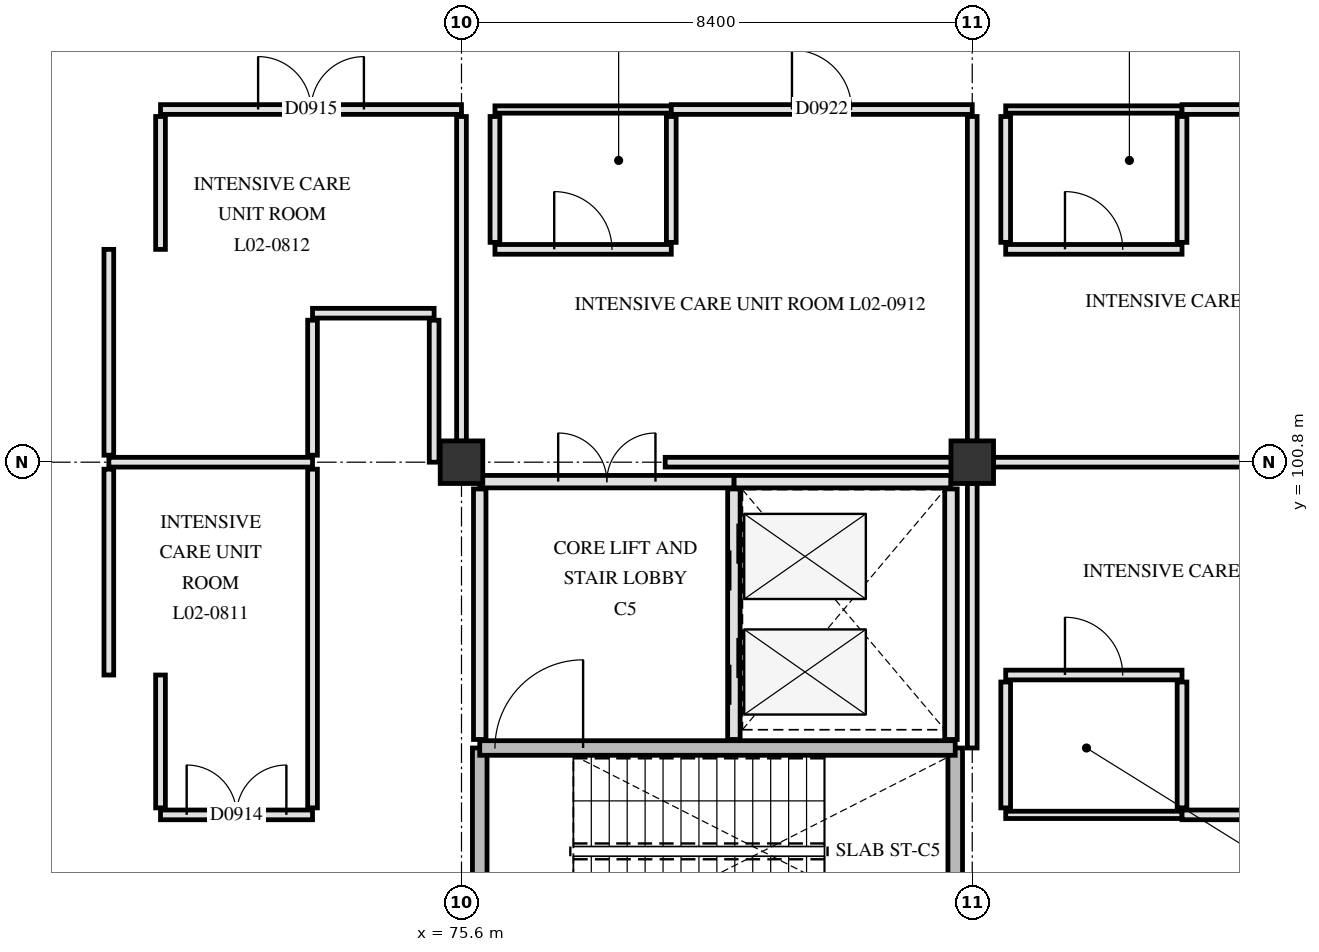
"""IFC4 building model, lengths in metres.
Left out: names, types, materials, properties, quantities, classifications, styles, units other than length and angle.
Written with IfcOpenShell. Run it as: python <this file> out.ifc"""

import sys

from ifc_helpers import new_model, si_unit, direction, frame, frame_2d, origin, origin_2d, place, context, subcontext, project, spatial, rectangle, extrude, element, fill, save


model = new_model("IFC4")
c1 = context("Model", 3, precision=1e-05, world=origin(), true_north=direction((0.0, 1.0)))
c2 = subcontext(c1, "Body", "Model", "MODEL_VIEW")
j1 = project(units=[si_unit("LENGTHUNIT", "METRE"), si_unit("PLANEANGLEUNIT", "RADIAN")], contexts=[c1])
p1 = place(None, origin())
s1 = spatial("IfcSite", under=j1, at=p1, CompositionType="ELEMENT")
p2 = place(p1, origin())
s2 = spatial("IfcBuilding", under=s1, at=p2, CompositionType="ELEMENT")
p3 = place(p2, frame((0.0, 0.0, 9.3)))
s3 = spatial("IfcBuildingStorey", under=s2, at=p3, CompositionType="ELEMENT", Elevation=9.3)
for number, where, z_axis, x_axis in (
    (1, (75.6, 100.8, 0.0), (0.0, 0.0, 1.0), (1.0, 0.0, 0.0)),
    (2, (84.0, 100.8, 0.0), (0.0, 0.0, 1.0), (1.0, 0.0, 0.0)),
):
    element("IfcColumn", number, at=place(p3, frame(where, z_axis=z_axis, x_axis=x_axis)), inside=s3, PredefinedType="COLUMN", context=c2, shape_type="SweptSolid", body=[
        extrude(rectangle(XDim=0.7, YDim=0.7, at=origin_2d()), origin(), (0.0, 0.0, 1.0), 5.1),
    ])
for number, where, z_axis, x_axis in (
    (3, (75.9, 92.78, 0.0), (0.0, 0.0, 1.0), (0.0, 1.0, 0.0)),
    (4, (83.72, 92.78, 0.0), (0.0, 0.0, 1.0), (0.0, 1.0, 0.0)),
):
    element("IfcWall", number, at=place(p3, frame(where, z_axis=z_axis, x_axis=x_axis)), inside=s3, PredefinedType="SHEAR", context=c2, shape_type="SweptSolid", body=[
        extrude(rectangle(XDim=3.32, YDim=0.24, at=frame_2d((1.66, 0.0))), origin(), (0.0, 0.0, 1.0), 4.78),
    ])
p4 = place(p3, frame((75.9, 96.1, 0.0), z_axis=(0.0, 0.0, 1.0), x_axis=(1.0, 0.0, 0.0)))
e5 = element("IfcWall", 5, at=p4, inside=s3, PredefinedType="SHEAR", context=c2, shape_type="SweptSolid", body=[
    extrude(rectangle(XDim=7.82, YDim=0.24, at=frame_2d((3.91, 0.0))), origin(), (0.0, 0.0, 1.0), 4.78),
])
p5 = place(p4, frame((0.25, 0.0, 0.0)))
e6 = element("IfcOpeningElement", 6, at=p5, cuts=e5, PredefinedType="OPENING", context=c2, shape_type="SweptSolid", body=[
    extrude(rectangle(XDim=1.45, YDim=2.2, at=frame_2d((0.725, 1.1))), frame((0.0, 0.13, 0.0), z_axis=(0.0, -1.0, 0.0), x_axis=(1.0, 0.0, 0.0)), (0.0, 0.0, 1.0), 0.26),
])
p6 = place(p3, frame((80.08, 96.24, 0.0), z_axis=(0.0, 0.0, 1.0), x_axis=(0.0, 1.0, 0.0)))
e7 = element("IfcWall", 7, at=p6, inside=s3, PredefinedType="PARTITIONING", context=c2, shape_type="SweptSolid", body=[
    extrude(rectangle(XDim=4.12, YDim=0.205, at=frame_2d((2.06, 0.0))), origin(), (0.0, 0.0, 1.0), 4.77),
])
p7 = place(p6, frame((0.57, 0.0, 0.0)))
e8 = element("IfcOpeningElement", 8, at=p7, cuts=e7, PredefinedType="OPENING", context=c2, shape_type="SweptSolid", body=[
    extrude(rectangle(XDim=1.1, YDim=2.15, at=frame_2d((0.55, 1.075))), frame((0.0, 0.113, 0.0), z_axis=(0.0, -1.0, 0.0), x_axis=(1.0, 0.0, 0.0)), (0.0, 0.0, 1.0), 0.225),
])
p8 = place(p6, frame((2.45, 0.0, 0.0)))
e9 = element("IfcOpeningElement", 9, at=p8, cuts=e7, PredefinedType="OPENING", context=c2, shape_type="SweptSolid", body=[
    extrude(rectangle(XDim=1.1, YDim=2.15, at=frame_2d((0.55, 1.075))), frame((0.0, 0.113, 0.0), z_axis=(0.0, -1.0, 0.0), x_axis=(1.0, 0.0, 0.0)), (0.0, 0.0, 1.0), 0.225),
])
p9 = place(p3, frame((83.65, 96.24, 0.0), z_axis=(0.0, 0.0, 1.0), x_axis=(0.0, 1.0, 0.0)))
e10 = element("IfcWall", 10, at=p9, inside=s3, PredefinedType="PARTITIONING", context=c2, shape_type="SweptSolid", body=[
    extrude(rectangle(XDim=4.12, YDim=0.205, at=frame_2d((2.06, 0.0))), origin(), (0.0, 0.0, 1.0), 4.77),
])
p10 = place(p3, frame((80.08, 100.48, 0.0), z_axis=(0.0, 0.0, 1.0), x_axis=(1.0, 0.0, 0.0)))
e11 = element("IfcWall", 11, at=p10, inside=s3, PredefinedType="PARTITIONING", context=c2, shape_type="SweptSolid", body=[
    extrude(rectangle(XDim=3.57, YDim=0.205, at=frame_2d((1.785, 0.0))), origin(), (0.0, 0.0, 1.0), 4.17),
])
p11 = place(p3, frame((75.9, 96.24, 0.0), z_axis=(0.0, 0.0, 1.0), x_axis=(0.0, 1.0, 0.0)))
e12 = element("IfcWall", 12, at=p11, inside=s3, PredefinedType="PARTITIONING", context=c2, shape_type="SweptSolid", body=[
    extrude(rectangle(XDim=4.12, YDim=0.205, at=frame_2d((2.06, 0.0))), origin(), (0.0, 0.0, 1.0), 4.17),
])
p12 = place(p3, frame((75.9, 100.48, 0.0), z_axis=(0.0, 0.0, 1.0), x_axis=(1.0, 0.0, 0.0)))
e13 = element("IfcWall", 13, at=p12, inside=s3, PredefinedType="PARTITIONING", context=c2, shape_type="SweptSolid", body=[
    extrude(rectangle(XDim=4.18, YDim=0.205, at=frame_2d((2.09, 0.0))), origin(), (0.0, 0.0, 1.0), 4.17),
])
p13 = place(p12, frame((1.29, 0.0, 0.0)))
e14 = element("IfcOpeningElement", 14, at=p13, cuts=e13, PredefinedType="OPENING", context=c2, shape_type="SweptSolid", body=[
    extrude(rectangle(XDim=1.6, YDim=2.25, at=frame_2d((0.8, 1.125))), frame((0.0, 0.113, 0.0), z_axis=(0.0, -1.0, 0.0), x_axis=(1.0, 0.0, 0.0)), (0.0, 0.0, 1.0), 0.225),
])
p14 = place(p3, frame((70.65, 95.0, 0.0), z_axis=(0.0, 0.0, 1.0), x_axis=(1.0, 0.0, 0.0)))
e15 = element("IfcWall", 15, at=p14, inside=s3, PredefinedType="PARTITIONING", context=c2, shape_type="SweptSolid", body=[
    extrude(rectangle(XDim=2.5, YDim=0.16, at=frame_2d((1.25, 0.0))), origin(), (0.0, 0.0, 1.0), 4.77),
])
p15 = place(p14, frame((0.43, 0.0, 0.0)))
e16 = element("IfcOpeningElement", 16, at=p15, cuts=e15, PredefinedType="OPENING", context=c2, shape_type="SweptSolid", body=[
    extrude(rectangle(XDim=1.64, YDim=2.28, at=frame_2d((0.82, 1.14))), frame((0.0, 0.09, 0.0), z_axis=(0.0, -1.0, 0.0), x_axis=(1.0, 0.0, 0.0)), (0.0, 0.0, 1.0), 0.18),
])
p16 = place(p3, frame((84.55, 95.0, 0.0), z_axis=(0.0, 0.0, 1.0), x_axis=(1.0, 0.0, 0.0)))
e17 = element("IfcWall", 17, at=p16, inside=s3, PredefinedType="PARTITIONING", context=c2, shape_type="SweptSolid", body=[
    extrude(rectangle(XDim=2.9, YDim=0.12, at=frame_2d((1.45, 0.0))), origin(), (0.0, 0.0, 1.0), 4.77),
])
p17 = place(p3, frame((87.45, 95.0, 0.0), z_axis=(0.0, 0.0, 1.0), x_axis=(1.0, 0.0, 0.0)))
e18 = element("IfcWall", 18, at=p17, inside=s3, PredefinedType="PARTITIONING", context=c2, shape_type="SweptSolid", body=[
    extrude(rectangle(XDim=4.95, YDim=0.16, at=frame_2d((2.475, 0.0))), origin(), (0.0, 0.0, 1.0), 4.17),
])
p18 = place(p17, frame((1.75, 0.0, 0.0)))
e19 = element("IfcOpeningElement", 19, at=p18, cuts=e18, PredefinedType="OPENING", context=c2, shape_type="SweptSolid", body=[
    extrude(rectangle(XDim=1.45, YDim=2.2, at=frame_2d((0.725, 1.1))), frame((0.0, 0.09, 0.0), z_axis=(0.0, -1.0, 0.0), x_axis=(1.0, 0.0, 0.0)), (0.0, 0.0, 1.0), 0.18),
])
p19 = place(p3, frame((84.55, 97.3, 0.0), z_axis=(0.0, 0.0, 1.0), x_axis=(1.0, 0.0, 0.0)))
e20 = element("IfcWall", 20, at=p19, inside=s3, PredefinedType="PARTITIONING", context=c2, shape_type="SweptSolid", body=[
    extrude(rectangle(XDim=2.9, YDim=0.16, at=frame_2d((1.45, 0.0))), origin(), (0.0, 0.0, 1.0), 4.77),
])
p20 = place(p19, frame((0.975, 0.0, 0.0)))
e21 = element("IfcOpeningElement", 21, at=p20, cuts=e20, PredefinedType="OPENING", context=c2, shape_type="SweptSolid", body=[
    extrude(rectangle(XDim=0.95, YDim=2.1, at=frame_2d((0.475, 1.05))), frame((0.0, 0.09, 0.0), z_axis=(0.0, -1.0, 0.0), x_axis=(1.0, 0.0, 0.0)), (0.0, 0.0, 1.0), 0.18),
])
p21 = place(p3, frame((69.8, 100.8, 0.0), z_axis=(0.0, 0.0, 1.0), x_axis=(1.0, 0.0, 0.0)))
e22 = element("IfcWall", 22, at=p21, inside=s3, PredefinedType="PARTITIONING", context=c2, shape_type="SweptSolid", body=[
    extrude(rectangle(XDim=3.35, YDim=0.16, at=frame_2d((1.675, 0.0))), origin(), (0.0, 0.0, 1.0), 4.17),
])
p22 = place(p3, frame((78.95, 100.8, 0.0), z_axis=(0.0, 0.0, 1.0), x_axis=(1.0, 0.0, 0.0)))
e23 = element("IfcWall", 23, at=p22, inside=s3, PredefinedType="PARTITIONING", context=c2, shape_type="SweptSolid", body=[
    extrude(rectangle(XDim=4.705, YDim=0.16, at=frame_2d((2.353, 0.0))), origin(), (0.0, 0.0, 1.0), 4.17),
])
p23 = place(p3, frame((84.345, 100.8, 0.0), z_axis=(0.0, 0.0, 1.0), x_axis=(1.0, 0.0, 0.0)))
e24 = element("IfcWall", 24, at=p23, inside=s3, PredefinedType="PARTITIONING", context=c2, shape_type="SweptSolid", body=[
    extrude(rectangle(XDim=7.71, YDim=0.16, at=frame_2d((3.855, 0.0))), origin(), (0.0, 0.0, 1.0), 4.17),
])
p24 = place(p3, frame((73.15, 103.25, 0.0), z_axis=(0.0, 0.0, 1.0), x_axis=(1.0, 0.0, 0.0)))
e25 = element("IfcWall", 25, at=p24, inside=s3, PredefinedType="PARTITIONING", context=c2, shape_type="SweptSolid", body=[
    extrude(rectangle(XDim=2.0, YDim=0.16, at=frame_2d((1.0, 0.0))), origin(), (0.0, 0.0, 1.0), 4.77),
])
p25 = place(p3, frame((76.15, 104.3, 0.0), z_axis=(0.0, 0.0, 1.0), x_axis=(1.0, 0.0, 0.0)))
e26 = element("IfcWall", 26, at=p25, inside=s3, PredefinedType="PARTITIONING", context=c2, shape_type="SweptSolid", body=[
    extrude(rectangle(XDim=2.9, YDim=0.16, at=frame_2d((1.45, 0.0))), origin(), (0.0, 0.0, 1.0), 4.77),
])
p26 = place(p25, frame((0.975, 0.0, 0.0)))
e27 = element("IfcOpeningElement", 27, at=p26, cuts=e26, PredefinedType="OPENING", context=c2, shape_type="SweptSolid", body=[
    extrude(rectangle(XDim=0.95, YDim=2.1, at=frame_2d((0.475, 1.05))), frame((0.0, 0.09, 0.0), z_axis=(0.0, -1.0, 0.0), x_axis=(1.0, 0.0, 0.0)), (0.0, 0.0, 1.0), 0.18),
])
p27 = place(p3, frame((84.55, 104.3, 0.0), z_axis=(0.0, 0.0, 1.0), x_axis=(1.0, 0.0, 0.0)))
e28 = element("IfcWall", 28, at=p27, inside=s3, PredefinedType="PARTITIONING", context=c2, shape_type="SweptSolid", body=[
    extrude(rectangle(XDim=2.9, YDim=0.16, at=frame_2d((1.45, 0.0))), origin(), (0.0, 0.0, 1.0), 4.77),
])
p28 = place(p27, frame((0.975, 0.0, 0.0)))
e29 = element("IfcOpeningElement", 29, at=p28, cuts=e28, PredefinedType="OPENING", context=c2, shape_type="SweptSolid", body=[
    extrude(rectangle(XDim=0.95, YDim=2.1, at=frame_2d((0.475, 1.05))), frame((0.0, 0.09, 0.0), z_axis=(0.0, -1.0, 0.0), x_axis=(1.0, 0.0, 0.0)), (0.0, 0.0, 1.0), 0.18),
])
p29 = place(p3, frame((70.65, 106.6, 0.0), z_axis=(0.0, 0.0, 1.0), x_axis=(1.0, 0.0, 0.0)))
e30 = element("IfcWall", 30, at=p29, inside=s3, PredefinedType="PARTITIONING", context=c2, shape_type="SweptSolid", body=[
    extrude(rectangle(XDim=4.95, YDim=0.16, at=frame_2d((2.475, 0.0))), origin(), (0.0, 0.0, 1.0), 4.17),
])
p30 = place(p29, frame((1.605, 0.0, 0.0)))
e31 = element("IfcOpeningElement", 31, at=p30, cuts=e30, PredefinedType="OPENING", context=c2, shape_type="SweptSolid", body=[
    extrude(rectangle(XDim=1.74, YDim=2.24, at=frame_2d((0.87, 1.12))), frame((0.0, 0.09, 0.0), z_axis=(0.0, -1.0, 0.0), x_axis=(1.0, 0.0, 0.0)), (0.0, 0.0, 1.0), 0.18),
])
p31 = place(p3, frame((76.15, 106.6, 0.0), z_axis=(0.0, 0.0, 1.0), x_axis=(1.0, 0.0, 0.0)))
e32 = element("IfcWall", 32, at=p31, inside=s3, PredefinedType="PARTITIONING", context=c2, shape_type="SweptSolid", body=[
    extrude(rectangle(XDim=2.9, YDim=0.12, at=frame_2d((1.45, 0.0))), origin(), (0.0, 0.0, 1.0), 4.77),
])
p32 = place(p3, frame((79.05, 106.6, 0.0), z_axis=(0.0, 0.0, 1.0), x_axis=(1.0, 0.0, 0.0)))
e33 = element("IfcWall", 33, at=p32, inside=s3, PredefinedType="PARTITIONING", context=c2, shape_type="SweptSolid", body=[
    extrude(rectangle(XDim=4.95, YDim=0.16, at=frame_2d((2.475, 0.0))), origin(), (0.0, 0.0, 1.0), 4.17),
])
p33 = place(p32, frame((1.985, 0.0, 0.0)))
e34 = element("IfcOpeningElement", 34, at=p33, cuts=e33, PredefinedType="OPENING", context=c2, shape_type="SweptSolid", body=[
    extrude(rectangle(XDim=0.98, YDim=2.12, at=frame_2d((0.49, 1.06))), frame((0.0, 0.09, 0.0), z_axis=(0.0, -1.0, 0.0), x_axis=(1.0, 0.0, 0.0)), (0.0, 0.0, 1.0), 0.18),
])
p34 = place(p3, frame((84.55, 106.6, 0.0), z_axis=(0.0, 0.0, 1.0), x_axis=(1.0, 0.0, 0.0)))
e35 = element("IfcWall", 35, at=p34, inside=s3, PredefinedType="PARTITIONING", context=c2, shape_type="SweptSolid", body=[
    extrude(rectangle(XDim=2.9, YDim=0.12, at=frame_2d((1.45, 0.0))), origin(), (0.0, 0.0, 1.0), 4.77),
])
p35 = place(p3, frame((87.45, 106.6, 0.0), z_axis=(0.0, 0.0, 1.0), x_axis=(1.0, 0.0, 0.0)))
e36 = element("IfcWall", 36, at=p35, inside=s3, PredefinedType="PARTITIONING", context=c2, shape_type="SweptSolid", body=[
    extrude(rectangle(XDim=4.95, YDim=0.16, at=frame_2d((2.475, 0.0))), origin(), (0.0, 0.0, 1.0), 4.17),
])
p36 = place(p35, frame((1.575, 0.0, 0.0)))
e37 = element("IfcOpeningElement", 37, at=p36, cuts=e36, PredefinedType="OPENING", context=c2, shape_type="SweptSolid", body=[
    extrude(rectangle(XDim=1.8, YDim=2.25, at=frame_2d((0.9, 1.125))), frame((0.0, 0.09, 0.0), z_axis=(0.0, -1.0, 0.0), x_axis=(1.0, 0.0, 0.0)), (0.0, 0.0, 1.0), 0.18),
])
for number, where, z_axis, x_axis in (
    (38, (69.8, 97.3, 0.0), (0.0, 0.0, 1.0), (0.0, 1.0, 0.0)),
    (39, (69.8, 100.915, 0.0), (0.0, 0.0, 1.0), (0.0, 1.0, 0.0)),
):
    element("IfcWall", number, at=place(p3, frame(where, z_axis=z_axis, x_axis=x_axis)), inside=s3, PredefinedType="PARTITIONING", context=c2, shape_type="SweptSolid", body=[
        extrude(rectangle(XDim=3.385, YDim=0.16, at=frame_2d((1.692, 0.0))), origin(), (0.0, 0.0, 1.0), 4.17),
    ])
for number, where, z_axis, x_axis in (
    (40, (70.65, 95.115, 0.0), (0.0, 0.0, 1.0), (0.0, 1.0, 0.0)),
    (41, (70.65, 104.3, 0.0), (0.0, 0.0, 1.0), (0.0, 1.0, 0.0)),
):
    element("IfcWall", number, at=place(p3, frame(where, z_axis=z_axis, x_axis=x_axis)), inside=s3, PredefinedType="PARTITIONING", context=c2, shape_type="SweptSolid", body=[
        extrude(rectangle(XDim=2.185, YDim=0.16, at=frame_2d((1.093, 0.0))), origin(), (0.0, 0.0, 1.0), 4.77),
    ])
p37 = place(p3, frame((73.15, 95.115, 0.0), z_axis=(0.0, 0.0, 1.0), x_axis=(0.0, 1.0, 0.0)))
e42 = element("IfcWall", 42, at=p37, inside=s3, PredefinedType="PARTITIONING", context=c2, shape_type="SweptSolid", body=[
    extrude(rectangle(XDim=5.57, YDim=0.16, at=frame_2d((2.785, 0.0))), origin(), (0.0, 0.0, 1.0), 4.17),
])
p38 = place(p3, frame((73.15, 100.915, 0.0), z_axis=(0.0, 0.0, 1.0), x_axis=(0.0, 1.0, 0.0)))
e43 = element("IfcWall", 43, at=p38, inside=s3, PredefinedType="PARTITIONING", context=c2, shape_type="SweptSolid", body=[
    extrude(rectangle(XDim=2.22, YDim=0.16, at=frame_2d((1.11, 0.0))), origin(), (0.0, 0.0, 1.0), 4.17),
])
p39 = place(p3, frame((75.15, 100.8, 0.0), z_axis=(0.0, 0.0, 1.0), x_axis=(0.0, 1.0, 0.0)))
e44 = element("IfcWall", 44, at=p39, inside=s3, PredefinedType="PARTITIONING", context=c2, shape_type="SweptSolid", body=[
    extrude(rectangle(XDim=2.335, YDim=0.16, at=frame_2d((1.167, 0.0))), origin(), (0.0, 0.0, 1.0), 4.17),
])
p40 = place(p3, frame((75.6, 101.145, 0.0), z_axis=(0.0, 0.0, 1.0), x_axis=(0.0, 1.0, 0.0)))
e45 = element("IfcWall", 45, at=p40, inside=s3, PredefinedType="PARTITIONING", context=c2, shape_type="SweptSolid", body=[
    extrude(rectangle(XDim=5.34, YDim=0.16, at=frame_2d((2.67, 0.0))), origin(), (0.0, 0.0, 1.0), 4.17),
])
for number, where, z_axis, x_axis in (
    (46, (76.15, 104.415, 0.0), (0.0, 0.0, 1.0), (0.0, 1.0, 0.0)),
    (47, (79.05, 104.415, 0.0), (0.0, 0.0, 1.0), (0.0, 1.0, 0.0)),
):
    element("IfcWall", number, at=place(p3, frame(where, z_axis=z_axis, x_axis=x_axis)), inside=s3, PredefinedType="PARTITIONING", context=c2, shape_type="SweptSolid", body=[
        extrude(rectangle(XDim=2.07, YDim=0.16, at=frame_2d((1.035, 0.0))), origin(), (0.0, 0.0, 1.0), 4.77),
    ])
p41 = place(p3, frame((84.0, 96.1, 0.0), z_axis=(0.0, 0.0, 1.0), x_axis=(0.0, 1.0, 0.0)))
e48 = element("IfcWall", 48, at=p41, inside=s3, PredefinedType="PARTITIONING", context=c2, shape_type="SweptSolid", body=[
    extrude(rectangle(XDim=4.355, YDim=0.16, at=frame_2d((2.177, 0.0))), origin(), (0.0, 0.0, 1.0), 4.17),
])
p42 = place(p3, frame((84.0, 101.145, 0.0), z_axis=(0.0, 0.0, 1.0), x_axis=(0.0, 1.0, 0.0)))
e49 = element("IfcWall", 49, at=p42, inside=s3, PredefinedType="PARTITIONING", context=c2, shape_type="SweptSolid", body=[
    extrude(rectangle(XDim=5.34, YDim=0.16, at=frame_2d((2.67, 0.0))), origin(), (0.0, 0.0, 1.0), 4.17),
])
for number, where, z_axis, x_axis in (
    (50, (84.55, 95.115, 0.0), (0.0, 0.0, 1.0), (0.0, 1.0, 0.0)),
    (51, (84.55, 104.415, 0.0), (0.0, 0.0, 1.0), (0.0, 1.0, 0.0)),
    (52, (87.45, 95.115, 0.0), (0.0, 0.0, 1.0), (0.0, 1.0, 0.0)),
    (53, (87.45, 104.415, 0.0), (0.0, 0.0, 1.0), (0.0, 1.0, 0.0)),
):
    element("IfcWall", number, at=place(p3, frame(where, z_axis=z_axis, x_axis=x_axis)), inside=s3, PredefinedType="PARTITIONING", context=c2, shape_type="SweptSolid", body=[
        extrude(rectangle(XDim=2.07, YDim=0.16, at=frame_2d((1.035, 0.0))), origin(), (0.0, 0.0, 1.0), 4.77),
    ])
p43 = place(p5, origin())
e54 = element("IfcDoor", 54, at=p43, inside=s3, OperationType="SINGLE_SWING_RIGHT", PredefinedType="DOOR", context=c2, shape_type="SweptSolid", body=[
    extrude(rectangle(XDim=1.45, YDim=2.2, at=frame_2d((0.725, 1.1))), frame((0.0, 0.025, 0.0), z_axis=(0.0, -1.0, 0.0), x_axis=(1.0, 0.0, 0.0)), (0.0, 0.0, 1.0), 0.05),
])
fill(e6, e54)
p44 = place(p7, origin())
e55 = element("IfcDoor", 55, at=p44, inside=s3, OperationType="SLIDING_TO_LEFT", PredefinedType="DOOR", context=c2, shape_type="SweptSolid", body=[
    extrude(rectangle(XDim=1.1, YDim=2.15, at=frame_2d((0.55, 1.075))), frame((0.0, 0.025, 0.0), z_axis=(0.0, -1.0, 0.0), x_axis=(1.0, 0.0, 0.0)), (0.0, 0.0, 1.0), 0.05),
])
fill(e8, e55)
p45 = place(p8, origin())
e56 = element("IfcDoor", 56, at=p45, inside=s3, OperationType="SLIDING_TO_LEFT", PredefinedType="DOOR", context=c2, shape_type="SweptSolid", body=[
    extrude(rectangle(XDim=1.1, YDim=2.15, at=frame_2d((0.55, 1.075))), frame((0.0, 0.025, 0.0), z_axis=(0.0, -1.0, 0.0), x_axis=(1.0, 0.0, 0.0)), (0.0, 0.0, 1.0), 0.05),
])
fill(e9, e56)
p46 = place(p13, origin())
e57 = element("IfcDoor", 57, at=p46, inside=s3, OperationType="DOUBLE_SWING_LEFT", PredefinedType="DOOR", context=c2, shape_type="SweptSolid", body=[
    extrude(rectangle(XDim=1.6, YDim=2.25, at=frame_2d((0.8, 1.125))), frame((0.0, 0.025, 0.0), z_axis=(0.0, -1.0, 0.0), x_axis=(1.0, 0.0, 0.0)), (0.0, 0.0, 1.0), 0.05),
])
fill(e14, e57)
p47 = place(p15, origin())
e58 = element("IfcDoor", 58, at=p47, inside=s3, OperationType="DOUBLE_SWING_LEFT", PredefinedType="DOOR", context=c2, shape_type="SweptSolid", body=[
    extrude(rectangle(XDim=1.64, YDim=2.28, at=frame_2d((0.82, 1.14))), frame((0.0, 0.025, 0.0), z_axis=(0.0, -1.0, 0.0), x_axis=(1.0, 0.0, 0.0)), (0.0, 0.0, 1.0), 0.05),
])
fill(e16, e58)
p48 = place(p30, origin())
e59 = element("IfcDoor", 59, at=p48, inside=s3, OperationType="DOUBLE_SWING_RIGHT", PredefinedType="DOOR", context=c2, shape_type="SweptSolid", body=[
    extrude(rectangle(XDim=1.74, YDim=2.24, at=frame_2d((0.87, 1.12))), frame((0.0, 0.025, 0.0), z_axis=(0.0, -1.0, 0.0), x_axis=(1.0, 0.0, 0.0)), (0.0, 0.0, 1.0), 0.05),
])
fill(e31, e59)
p49 = place(p33, origin())
e60 = element("IfcDoor", 60, at=p49, inside=s3, OperationType="SINGLE_SWING_LEFT", PredefinedType="DOOR", context=c2, shape_type="SweptSolid", body=[
    extrude(rectangle(XDim=0.98, YDim=2.12, at=frame_2d((0.49, 1.06))), frame((0.0, 0.025, 0.0), z_axis=(0.0, -1.0, 0.0), x_axis=(1.0, 0.0, 0.0)), (0.0, 0.0, 1.0), 0.05),
])
fill(e34, e60)
p50 = place(p26, origin())
e61 = element("IfcDoor", 61, at=p50, inside=s3, OperationType="SINGLE_SWING_LEFT", PredefinedType="DOOR", context=c2, shape_type="SweptSolid", body=[
    extrude(rectangle(XDim=0.95, YDim=2.1, at=frame_2d((0.475, 1.05))), frame((0.0, 0.025, 0.0), z_axis=(0.0, -1.0, 0.0), x_axis=(1.0, 0.0, 0.0)), (0.0, 0.0, 1.0), 0.05),
])
fill(e27, e61)
p51 = place(p20, origin())
e62 = element("IfcDoor", 62, at=p51, inside=s3, OperationType="SINGLE_SWING_LEFT", PredefinedType="DOOR", context=c2, shape_type="SweptSolid", body=[
    extrude(rectangle(XDim=0.95, YDim=2.1, at=frame_2d((0.475, 1.05))), frame((0.0, 0.025, 0.0), z_axis=(0.0, -1.0, 0.0), x_axis=(1.0, 0.0, 0.0)), (0.0, 0.0, 1.0), 0.05),
])
fill(e21, e62)
p52 = place(p28, origin())
e63 = element("IfcDoor", 63, at=p52, inside=s3, OperationType="SINGLE_SWING_LEFT", PredefinedType="DOOR", context=c2, shape_type="SweptSolid", body=[
    extrude(rectangle(XDim=0.95, YDim=2.1, at=frame_2d((0.475, 1.05))), frame((0.0, 0.025, 0.0), z_axis=(0.0, -1.0, 0.0), x_axis=(1.0, 0.0, 0.0)), (0.0, 0.0, 1.0), 0.05),
])
fill(e29, e63)
save(model, sys.argv[1])
